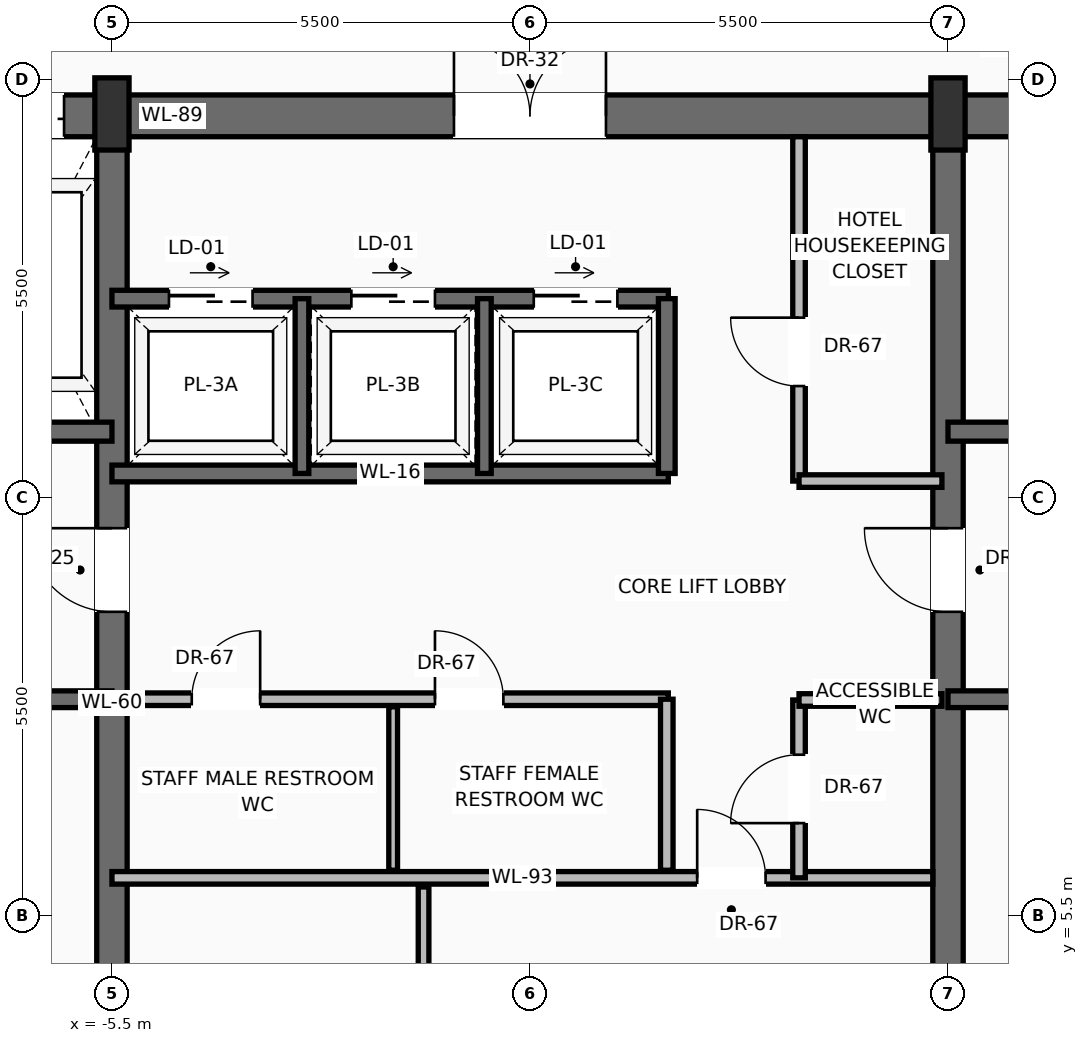
"""IFC4 building model, lengths in metres.
Left out: names, types, materials, properties, quantities, classifications, styles, units other than length and angle.
Written with IfcOpenShell. Run it as: python <this file> out.ifc"""

import sys

from ifc_helpers import new_model, si_unit, direction, frame, frame_2d, origin, origin_2d, place, context, subcontext, project, spatial, rectangle, extrude, source, transform, mapped, element, fill, save


model = new_model("IFC4")
c1 = context("Model", 3, precision=1e-05, world=origin(), true_north=direction((0.0, 1.0)))
c2 = subcontext(c1, "Body", "Model", "MODEL_VIEW")
j1 = project(units=[si_unit("LENGTHUNIT", "METRE"), si_unit("PLANEANGLEUNIT", "RADIAN")], contexts=[c1])
p1 = place(None, origin())
s1 = spatial("IfcSite", under=j1, at=p1, CompositionType="ELEMENT")
p2 = place(p1, origin())
s2 = spatial("IfcBuilding", under=s1, at=p2, CompositionType="ELEMENT")
p3 = place(p2, frame((0.0, 0.0, 226.9)))
s3 = spatial("IfcBuildingStorey", under=s2, at=p3, CompositionType="ELEMENT", Elevation=226.9)
p4 = place(p3, frame((-10.7, 16.025, 0.0), z_axis=(0.0, 0.0, 1.0), x_axis=(1.0, 0.0, 0.0)))
e1 = element("IfcWall", 1, at=p4, inside=s3, PredefinedType="SHEAR", context=c2, shape_type="SweptSolid", body=[
    extrude(rectangle(XDim=21.4, YDim=0.55, at=frame_2d((10.7, 0.0))), origin(), (0.0, 0.0, 1.0), 3.24),
])
p5 = place(p4, frame((3.27, 0.0, 0.0)))
e2 = element("IfcOpeningElement", 2, at=p5, cuts=e1, PredefinedType="OPENING", context=c2, shape_type="SweptSolid", body=[
    extrude(rectangle(XDim=1.3, YDim=2.3, at=frame_2d((0.65, 1.15))), frame((0.0, 0.285, 0.0), z_axis=(0.0, -1.0, 0.0), x_axis=(1.0, 0.0, 0.0)), (0.0, 0.0, 1.0), 0.57),
])
p6 = place(p4, frame((9.7, 0.0, 0.0)))
e3 = element("IfcOpeningElement", 3, at=p6, cuts=e1, PredefinedType="OPENING", context=c2, shape_type="SweptSolid", body=[
    extrude(rectangle(XDim=2.0, YDim=2.4, at=frame_2d((1.0, 1.2))), frame((0.0, 0.285, 0.0), z_axis=(0.0, -1.0, 0.0), x_axis=(1.0, 0.0, 0.0)), (0.0, 0.0, 1.0), 0.57),
])
p7 = place(p3, frame((-5.5, 0.575, 0.0), z_axis=(0.0, 0.0, 1.0), x_axis=(0.0, 1.0, 0.0)))
e4 = element("IfcWall", 4, at=p7, inside=s3, PredefinedType="SHEAR", context=c2, shape_type="SweptSolid", body=[
    extrude(rectangle(XDim=15.45, YDim=0.4, at=frame_2d((7.725, 0.0))), origin(), (0.0, 0.0, 1.0), 3.24),
])
p8 = place(p7, frame((8.925, 0.0, 0.0)))
e5 = element("IfcOpeningElement", 5, at=p8, cuts=e4, PredefinedType="OPENING", context=c2, shape_type="SweptSolid", body=[
    extrude(rectangle(XDim=1.1, YDim=2.2, at=frame_2d((0.55, 1.1))), frame((0.0, 0.21, 0.0), z_axis=(0.0, -1.0, 0.0), x_axis=(1.0, 0.0, 0.0)), (0.0, 0.0, 1.0), 0.42),
])
p9 = place(p3, frame((5.5, 0.575, 0.0), z_axis=(0.0, 0.0, 1.0), x_axis=(0.0, 1.0, 0.0)))
e6 = element("IfcWall", 6, at=p9, inside=s3, PredefinedType="SHEAR", context=c2, shape_type="SweptSolid", body=[
    extrude(rectangle(XDim=15.45, YDim=0.4, at=frame_2d((7.725, 0.0))), origin(), (0.0, 0.0, 1.0), 3.24),
])
p10 = place(p9, frame((8.925, 0.0, 0.0)))
e7 = element("IfcOpeningElement", 7, at=p10, cuts=e6, PredefinedType="OPENING", context=c2, shape_type="SweptSolid", body=[
    extrude(rectangle(XDim=1.1, YDim=2.2, at=frame_2d((0.55, 1.1))), frame((0.0, 0.21, 0.0), z_axis=(0.0, -1.0, 0.0), x_axis=(1.0, 0.0, 0.0)), (0.0, 0.0, 1.0), 0.42),
])
m1 = source(origin(), c2, "Body", "SweptSolid", [
    extrude(rectangle(XDim=0.45, YDim=0.95, at=origin_2d()), origin(), (0.0, 0.0, 1.0), 3.45),
])
for number, where, z_axis, x_axis in (
    (8, (-5.5, 16.05, 0.0), (0.0, 0.0, 1.0), (1.0, 0.0, 0.0)),
    (9, (5.5, 16.05, 0.0), (0.0, 0.0, 1.0), (1.0, 0.0, 0.0)),
):
    element("IfcColumn", number, at=place(p3, frame(where, z_axis=z_axis, x_axis=x_axis)), inside=s3, PredefinedType="PILASTER", context=c2, shape_type="MappedRepresentation", body=[
        mapped(m1, transform((0.0, 0.0, 0.0), scale=1.0)),
    ])
p11 = place(p3, frame((-5.5, 8.35, 0.0), z_axis=(0.0, 0.0, 1.0), x_axis=(-1.0, 0.0, 0.0)))
e10 = element("IfcWall", 10, at=p11, inside=s3, PredefinedType="SOLIDWALL", context=c2, shape_type="SweptSolid", body=[
    extrude(rectangle(XDim=4.65, YDim=0.22, at=frame_2d((2.325, 0.0))), origin(), (0.0, 0.0, 1.0), 3.24),
])
p12 = place(p11, frame((2.5, 0.0, 0.0)))
e11 = element("IfcOpeningElement", 11, at=p12, cuts=e10, PredefinedType="OPENING", context=c2, shape_type="SweptSolid", body=[
    extrude(rectangle(XDim=1.15, YDim=2.2, at=frame_2d((0.575, 1.1))), frame((0.0, 0.12, 0.0), z_axis=(0.0, -1.0, 0.0), x_axis=(1.0, 0.0, 0.0)), (0.0, 0.0, 1.0), 0.24),
])
p13 = place(p3, frame((-5.5, 11.87, 0.0), z_axis=(0.0, 0.0, 1.0), x_axis=(-1.0, 0.0, 0.0)))
e12 = element("IfcWall", 12, at=p13, inside=s3, PredefinedType="SOLIDWALL", context=c2, shape_type="SweptSolid", body=[
    extrude(rectangle(XDim=4.65, YDim=0.25, at=frame_2d((2.325, 0.0))), origin(), (0.0, 0.0, 1.0), 3.24),
])
p14 = place(p13, frame((2.95, 0.0, 0.0)))
e13 = element("IfcOpeningElement", 13, at=p14, cuts=e12, PredefinedType="OPENING", context=c2, shape_type="SweptSolid", body=[
    extrude(rectangle(XDim=1.2, YDim=2.25, at=frame_2d((0.6, 1.125))), frame((0.0, 0.135, 0.0), z_axis=(0.0, -1.0, 0.0), x_axis=(1.0, 0.0, 0.0)), (0.0, 0.0, 1.0), 0.27),
])
p15 = place(p3, frame((10.15, 8.35, 0.0), z_axis=(0.0, 0.0, 1.0), x_axis=(-1.0, 0.0, 0.0)))
e14 = element("IfcWall", 14, at=p15, inside=s3, PredefinedType="SOLIDWALL", context=c2, shape_type="SweptSolid", body=[
    extrude(rectangle(XDim=4.65, YDim=0.22, at=frame_2d((2.325, 0.0))), origin(), (0.0, 0.0, 1.0), 3.24),
])
p16 = place(p15, frame((1.0, 0.0, 0.0)))
e15 = element("IfcOpeningElement", 15, at=p16, cuts=e14, PredefinedType="OPENING", context=c2, shape_type="SweptSolid", body=[
    extrude(rectangle(XDim=1.15, YDim=2.2, at=frame_2d((0.575, 1.1))), frame((0.0, 0.12, 0.0), z_axis=(0.0, -1.0, 0.0), x_axis=(1.0, 0.0, 0.0)), (0.0, 0.0, 1.0), 0.24),
])
p17 = place(p3, frame((10.15, 11.87, 0.0), z_axis=(0.0, 0.0, 1.0), x_axis=(-1.0, 0.0, 0.0)))
e16 = element("IfcWall", 16, at=p17, inside=s3, PredefinedType="SOLIDWALL", context=c2, shape_type="SweptSolid", body=[
    extrude(rectangle(XDim=4.65, YDim=0.25, at=frame_2d((2.325, 0.0))), origin(), (0.0, 0.0, 1.0), 3.24),
])
p18 = place(p17, frame((0.5, 0.0, 0.0)))
e17 = element("IfcOpeningElement", 17, at=p18, cuts=e16, PredefinedType="OPENING", context=c2, shape_type="SweptSolid", body=[
    extrude(rectangle(XDim=1.2, YDim=2.25, at=frame_2d((0.6, 1.125))), frame((0.0, 0.135, 0.0), z_axis=(0.0, -1.0, 0.0), x_axis=(1.0, 0.0, 0.0)), (0.0, 0.0, 1.0), 0.27),
])
p19 = place(p3, frame((-5.5, 6.0, 0.0), z_axis=(0.0, 0.0, 1.0), x_axis=(1.0, 0.0, 0.0)))
e18 = element("IfcWall", 18, at=p19, inside=s3, PredefinedType="PARTITIONING", context=c2, shape_type="SweptSolid", body=[
    extrude(rectangle(XDim=10.8, YDim=0.165, at=frame_2d((5.4, 0.0))), origin(), (0.0, 0.0, 1.0), 3.232),
])
p20 = place(p19, frame((7.7, 0.0, 0.0)))
e19 = element("IfcOpeningElement", 19, at=p20, cuts=e18, PredefinedType="OPENING", context=c2, shape_type="SweptSolid", body=[
    extrude(rectangle(XDim=0.9, YDim=2.1, at=frame_2d((0.45, 1.05))), frame((0.0, 0.093, 0.0), z_axis=(0.0, -1.0, 0.0), x_axis=(1.0, 0.0, 0.0)), (0.0, 0.0, 1.0), 0.185),
])
p21 = place(p3, frame((-1.4, 0.85, 0.0), z_axis=(0.0, 0.0, 1.0), x_axis=(0.0, 1.0, 0.0)))
e20 = element("IfcWall", 20, at=p21, inside=s3, PredefinedType="PARTITIONING", context=c2, shape_type="SweptSolid", body=[
    extrude(rectangle(XDim=5.03, YDim=0.14, at=frame_2d((2.515, 0.0))), origin(), (0.0, 0.0, 1.0), 3.232),
])
p22 = place(p21, frame((2.1, 0.0, 0.0)))
e21 = element("IfcOpeningElement", 21, at=p22, cuts=e20, PredefinedType="OPENING", context=c2, shape_type="SweptSolid", body=[
    extrude(rectangle(XDim=0.9, YDim=2.1, at=frame_2d((0.45, 1.05))), frame((0.0, 0.08, 0.0), z_axis=(0.0, -1.0, 0.0), x_axis=(1.0, 0.0, 0.0)), (0.0, 0.0, 1.0), 0.16),
])
p23 = place(p3, frame((3.54, 6.0, 0.0), z_axis=(0.0, 0.0, 1.0), x_axis=(0.0, 1.0, 0.0)))
e22 = element("IfcWall", 22, at=p23, inside=s3, PredefinedType="PARTITIONING", context=c2, shape_type="SweptSolid", body=[
    extrude(rectangle(XDim=2.34, YDim=0.165, at=frame_2d((1.17, 0.0))), origin(), (0.0, 0.0, 1.0), 3.232),
])
p24 = place(p23, frame((0.72, 0.0, 0.0)))
e23 = element("IfcOpeningElement", 23, at=p24, cuts=e22, PredefinedType="OPENING", context=c2, shape_type="SweptSolid", body=[
    extrude(rectangle(XDim=0.9, YDim=2.1, at=frame_2d((0.45, 1.05))), frame((0.0, 0.093, 0.0), z_axis=(0.0, -1.0, 0.0), x_axis=(1.0, 0.0, 0.0)), (0.0, 0.0, 1.0), 0.185),
])
p25 = place(p3, frame((3.54, 8.34, 0.0), z_axis=(0.0, 0.0, 1.0), x_axis=(1.0, 0.0, 0.0)))
e24 = element("IfcWall", 24, at=p25, inside=s3, PredefinedType="PARTITIONING", context=c2, shape_type="SweptSolid", body=[
    extrude(rectangle(XDim=1.88, YDim=0.165, at=frame_2d((0.94, 0.0))), origin(), (0.0, 0.0, 1.0), 3.232),
])
p26 = place(p3, frame((-5.3, 8.35, 0.0), z_axis=(0.0, 0.0, 1.0), x_axis=(1.0, 0.0, 0.0)))
e25 = element("IfcWall", 25, at=p26, inside=s3, PredefinedType="PARTITIONING", context=c2, shape_type="SweptSolid", body=[
    extrude(rectangle(XDim=7.12, YDim=0.165, at=frame_2d((3.56, 0.0))), origin(), (0.0, 0.0, 1.0), 3.232),
])
p27 = place(p26, frame((0.85, 0.0, 0.0)))
e26 = element("IfcOpeningElement", 26, at=p27, cuts=e25, PredefinedType="OPENING", context=c2, shape_type="SweptSolid", body=[
    extrude(rectangle(XDim=0.9, YDim=2.1, at=frame_2d((0.45, 1.05))), frame((0.0, 0.093, 0.0), z_axis=(0.0, -1.0, 0.0), x_axis=(1.0, 0.0, 0.0)), (0.0, 0.0, 1.0), 0.185),
])
p28 = place(p26, frame((4.05, 0.0, 0.0)))
e27 = element("IfcOpeningElement", 27, at=p28, cuts=e25, PredefinedType="OPENING", context=c2, shape_type="SweptSolid", body=[
    extrude(rectangle(XDim=0.9, YDim=2.1, at=frame_2d((0.45, 1.05))), frame((0.0, 0.093, 0.0), z_axis=(0.0, -1.0, 0.0), x_axis=(1.0, 0.0, 0.0)), (0.0, 0.0, 1.0), 0.185),
])
p29 = place(p3, frame((1.8, 6.1, 0.0), z_axis=(0.0, 0.0, 1.0), x_axis=(0.0, 1.0, 0.0)))
e28 = element("IfcWall", 28, at=p29, inside=s3, PredefinedType="PARTITIONING", context=c2, shape_type="SweptSolid", body=[
    extrude(rectangle(XDim=2.25, YDim=0.165, at=frame_2d((1.125, 0.0))), origin(), (0.0, 0.0, 1.0), 3.232),
])
p30 = place(p3, frame((-1.8, 6.1, 0.0), z_axis=(0.0, 0.0, 1.0), x_axis=(0.0, 1.0, 0.0)))
e29 = element("IfcWall", 29, at=p30, inside=s3, PredefinedType="PARTITIONING", context=c2, shape_type="SweptSolid", body=[
    extrude(rectangle(XDim=2.15, YDim=0.115, at=frame_2d((1.075, 0.0))), origin(), (0.0, 0.0, 1.0), 3.232),
])
p31 = place(p3, frame((-5.5, 11.32, 0.0), z_axis=(0.0, 0.0, 1.0), x_axis=(1.0, 0.0, 0.0)))
e30 = element("IfcWall", 30, at=p31, inside=s3, PredefinedType="SOLIDWALL", context=c2, shape_type="SweptSolid", body=[
    extrude(rectangle(XDim=7.32, YDim=0.22, at=frame_2d((3.66, 0.0))), origin(), (0.0, 0.0, 1.0), 3.24),
])
p32 = place(p3, frame((-5.5, 13.62, 0.0), z_axis=(0.0, 0.0, 1.0), x_axis=(1.0, 0.0, 0.0)))
e31 = element("IfcWall", 31, at=p32, inside=s3, PredefinedType="SOLIDWALL", context=c2, shape_type="SweptSolid", body=[
    extrude(rectangle(XDim=7.32, YDim=0.22, at=frame_2d((3.66, 0.0))), origin(), (0.0, 0.0, 1.0), 3.24),
])
p33 = place(p32, frame((0.75, 0.0, 0.0)))
e32 = element("IfcOpeningElement", 32, at=p33, cuts=e31, PredefinedType="OPENING", context=c2, shape_type="SweptSolid", body=[
    extrude(rectangle(XDim=1.1, YDim=2.2, at=frame_2d((0.55, 1.1))), frame((0.0, 0.12, 0.0), z_axis=(0.0, -1.0, 0.0), x_axis=(1.0, 0.0, 0.0)), (0.0, 0.0, 1.0), 0.24),
])
p34 = place(p32, frame((3.15, 0.0, 0.0)))
e33 = element("IfcOpeningElement", 33, at=p34, cuts=e31, PredefinedType="OPENING", context=c2, shape_type="SweptSolid", body=[
    extrude(rectangle(XDim=1.1, YDim=2.2, at=frame_2d((0.55, 1.1))), frame((0.0, 0.12, 0.0), z_axis=(0.0, -1.0, 0.0), x_axis=(1.0, 0.0, 0.0)), (0.0, 0.0, 1.0), 0.24),
])
p35 = place(p32, frame((5.55, 0.0, 0.0)))
e34 = element("IfcOpeningElement", 34, at=p35, cuts=e31, PredefinedType="OPENING", context=c2, shape_type="SweptSolid", body=[
    extrude(rectangle(XDim=1.1, YDim=2.2, at=frame_2d((0.55, 1.1))), frame((0.0, 0.12, 0.0), z_axis=(0.0, -1.0, 0.0), x_axis=(1.0, 0.0, 0.0)), (0.0, 0.0, 1.0), 0.24),
])
p36 = place(p3, frame((1.8, 11.32, 0.0), z_axis=(0.0, 0.0, 1.0), x_axis=(0.0, 1.0, 0.0)))
e35 = element("IfcWall", 35, at=p36, inside=s3, PredefinedType="SOLIDWALL", context=c2, shape_type="SweptSolid", body=[
    extrude(rectangle(XDim=2.3, YDim=0.22, at=frame_2d((1.15, 0.0))), origin(), (0.0, 0.0, 1.0), 3.24),
])
for number, where, z_axis, x_axis in (
    (36, (-3.0, 11.32, 0.0), (0.0, 0.0, 1.0), (0.0, 1.0, 0.0)),
    (37, (-0.6, 11.32, 0.0), (0.0, 0.0, 1.0), (0.0, 1.0, 0.0)),
):
    element("IfcWall", number, at=place(p3, frame(where, z_axis=z_axis, x_axis=x_axis)), inside=s3, PredefinedType="SOLIDWALL", context=c2, shape_type="SweptSolid", body=[
        extrude(rectangle(XDim=2.3, YDim=0.18, at=frame_2d((1.15, 0.0))), origin(), (0.0, 0.0, 1.0), 3.24),
    ])
p37 = place(p3, frame((3.54, 11.22, 0.0), z_axis=(0.0, 0.0, 1.0), x_axis=(0.0, 1.0, 0.0)))
e38 = element("IfcWall", 38, at=p37, inside=s3, PredefinedType="PARTITIONING", context=c2, shape_type="SweptSolid", body=[
    extrude(rectangle(XDim=4.53, YDim=0.165, at=frame_2d((2.265, 0.0))), origin(), (0.0, 0.0, 1.0), 3.232),
])
p38 = place(p37, frame((1.25, 0.0, 0.0)))
e39 = element("IfcOpeningElement", 39, at=p38, cuts=e38, PredefinedType="OPENING", context=c2, shape_type="SweptSolid", body=[
    extrude(rectangle(XDim=0.9, YDim=2.1, at=frame_2d((0.45, 1.05))), frame((0.0, 0.093, 0.0), z_axis=(0.0, -1.0, 0.0), x_axis=(1.0, 0.0, 0.0)), (0.0, 0.0, 1.0), 0.185),
])
p39 = place(p3, frame((3.54, 11.22, 0.0), z_axis=(0.0, 0.0, 1.0), x_axis=(1.0, 0.0, 0.0)))
e40 = element("IfcWall", 40, at=p39, inside=s3, PredefinedType="PARTITIONING", context=c2, shape_type="SweptSolid", body=[
    extrude(rectangle(XDim=1.88, YDim=0.165, at=frame_2d((0.94, 0.0))), origin(), (0.0, 0.0, 1.0), 3.232),
])
m2 = source(origin(), c2, "Body", "SweptSolid", [
    extrude(rectangle(XDim=1.1, YDim=2.2, at=frame_2d((0.55, 1.1))), frame((0.0, 0.025, 0.0), z_axis=(0.0, -1.0, 0.0), x_axis=(1.0, 0.0, 0.0)), (0.0, 0.0, 1.0), 0.05),
])
p40 = place(p8, origin())
e41 = element("IfcDoor", 41, at=p40, inside=s3, OperationType="SINGLE_SWING_RIGHT", PredefinedType="DOOR", context=c2, shape_type="MappedRepresentation", body=[
    mapped(m2, transform((0.0, 0.0, 0.0), scale=1.0)),
])
fill(e5, e41)
m3 = source(origin(), c2, "Body", "SweptSolid", [
    extrude(rectangle(XDim=1.3, YDim=2.3, at=frame_2d((0.65, 1.15))), frame((0.0, 0.025, 0.0), z_axis=(0.0, -1.0, 0.0), x_axis=(1.0, 0.0, 0.0)), (0.0, 0.0, 1.0), 0.05),
])
p41 = place(p5, origin())
e42 = element("IfcDoor", 42, at=p41, inside=s3, OperationType="SLIDING_TO_RIGHT", PredefinedType="DOOR", context=c2, shape_type="MappedRepresentation", body=[
    mapped(m3, transform((0.0, 0.0, 0.0), scale=1.0)),
])
fill(e2, e42)
p42 = place(p10, origin())
e43 = element("IfcDoor", 43, at=p42, inside=s3, OperationType="SINGLE_SWING_RIGHT", PredefinedType="DOOR", context=c2, shape_type="MappedRepresentation", body=[
    mapped(m2, transform((0.0, 0.0, 0.0), scale=1.0)),
])
fill(e7, e43)
m4 = source(origin(), c2, "Body", "SweptSolid", [
    extrude(rectangle(XDim=2.0, YDim=2.4, at=frame_2d((1.0, 1.2))), frame((0.0, 0.025, 0.0), z_axis=(0.0, -1.0, 0.0), x_axis=(1.0, 0.0, 0.0)), (0.0, 0.0, 1.0), 0.05),
])
p43 = place(p6, origin())
e44 = element("IfcDoor", 44, at=p43, inside=s3, OperationType="DOUBLE_DOOR_SINGLE_SWING", PredefinedType="DOOR", context=c2, shape_type="MappedRepresentation", body=[
    mapped(m4, transform((0.0, 0.0, 0.0), scale=1.0)),
])
fill(e3, e44)
m5 = source(origin(), c2, "Body", "SweptSolid", [
    extrude(rectangle(XDim=0.9, YDim=2.1, at=frame_2d((0.45, 1.05))), frame((0.0, 0.025, 0.0), z_axis=(0.0, -1.0, 0.0), x_axis=(1.0, 0.0, 0.0)), (0.0, 0.0, 1.0), 0.05),
])
p44 = place(p20, origin())
e45 = element("IfcDoor", 45, at=p44, inside=s3, OperationType="SINGLE_SWING_LEFT", PredefinedType="DOOR", context=c2, shape_type="MappedRepresentation", body=[
    mapped(m5, transform((0.0, 0.0, 0.0), scale=1.0)),
])
fill(e19, e45)
p45 = place(p24, origin())
e46 = element("IfcDoor", 46, at=p45, inside=s3, OperationType="SINGLE_SWING_LEFT", PredefinedType="DOOR", context=c2, shape_type="MappedRepresentation", body=[
    mapped(m5, transform((0.0, 0.0, 0.0), scale=1.0)),
])
fill(e23, e46)
p46 = place(p27, origin())
e47 = element("IfcDoor", 47, at=p46, inside=s3, OperationType="SINGLE_SWING_RIGHT", PredefinedType="DOOR", context=c2, shape_type="MappedRepresentation", body=[
    mapped(m5, transform((0.0, 0.0, 0.0), scale=1.0)),
])
fill(e26, e47)
p47 = place(p28, origin())
e48 = element("IfcDoor", 48, at=p47, inside=s3, OperationType="SINGLE_SWING_LEFT", PredefinedType="DOOR", context=c2, shape_type="MappedRepresentation", body=[
    mapped(m5, transform((0.0, 0.0, 0.0), scale=1.0)),
])
fill(e27, e48)
m6 = source(origin(), c2, "Body", "SweptSolid", [
    extrude(rectangle(XDim=1.1, YDim=2.2, at=frame_2d((0.55, 1.1))), frame((0.0, 0.025, 0.0), z_axis=(0.0, -1.0, 0.0), x_axis=(1.0, 0.0, 0.0)), (0.0, 0.0, 1.0), 0.05),
])
p48 = place(p33, origin())
e49 = element("IfcDoor", 49, at=p48, inside=s3, OperationType="SLIDING_TO_RIGHT", PredefinedType="DOOR", context=c2, shape_type="MappedRepresentation", body=[
    mapped(m6, transform((0.0, 0.0, 0.0), scale=1.0)),
])
fill(e32, e49)
p49 = place(p34, origin())
e50 = element("IfcDoor", 50, at=p49, inside=s3, OperationType="SLIDING_TO_RIGHT", PredefinedType="DOOR", context=c2, shape_type="MappedRepresentation", body=[
    mapped(m6, transform((0.0, 0.0, 0.0), scale=1.0)),
])
fill(e33, e50)
p50 = place(p35, origin())
e51 = element("IfcDoor", 51, at=p50, inside=s3, OperationType="SLIDING_TO_RIGHT", PredefinedType="DOOR", context=c2, shape_type="MappedRepresentation", body=[
    mapped(m6, transform((0.0, 0.0, 0.0), scale=1.0)),
])
fill(e34, e51)
p51 = place(p38, origin())
e52 = element("IfcDoor", 52, at=p51, inside=s3, OperationType="SINGLE_SWING_RIGHT", PredefinedType="DOOR", context=c2, shape_type="MappedRepresentation", body=[
    mapped(m5, transform((0.0, 0.0, 0.0), scale=1.0)),
])
fill(e39, e52)
save(model, sys.argv[1])
